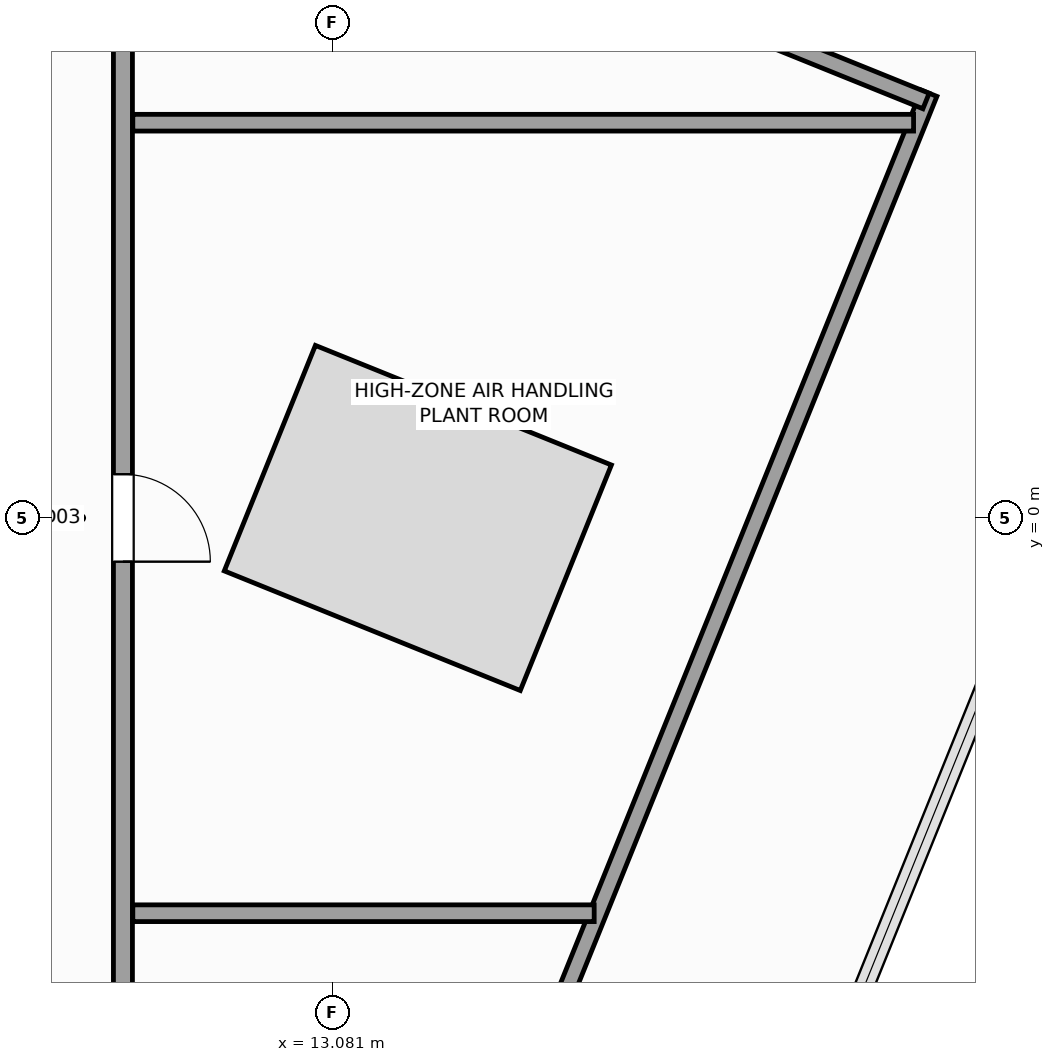
"""IFC4 building model, lengths in metres.
Left out: names, types, materials, properties, quantities, classifications, styles, units other than length and angle.
Written with IfcOpenShell. Run it as: python <this file> out.ifc"""

import sys

from ifc_helpers import new_model, si_unit, direction, frame, frame_2d, origin, place, context, subcontext, project, spatial, rectangle, extrude, source, transform, mapped, element, fill, save


model = new_model("IFC4")
c1 = context("Model", 3, precision=1e-05, world=origin(), true_north=direction((0.0, 1.0)))
c2 = subcontext(c1, "Body", "Model", "MODEL_VIEW")
j1 = project(units=[si_unit("LENGTHUNIT", "METRE"), si_unit("PLANEANGLEUNIT", "RADIAN")], contexts=[c1])
p1 = place(None, origin())
s1 = spatial("IfcSite", under=j1, at=p1, CompositionType="ELEMENT")
p2 = place(p1, origin())
s2 = spatial("IfcBuilding", under=s1, at=p2, CompositionType="ELEMENT")
p3 = place(p2, frame((0.0, 0.0, 325.6)))
s3 = spatial("IfcBuildingStorey", under=s2, at=p3, CompositionType="ELEMENT", Elevation=325.6)
p4 = place(p3, frame((11.172, -18.556, 0.0), z_axis=(0.0, 0.0, 1.0), x_axis=(0.374611707018, 0.927181788521, 0.0)))
e1 = element("IfcWall", 1, at=p4, inside=s3, PredefinedType="PARTITIONING", context=c2, shape_type="SweptSolid", body=[
    extrude(rectangle(XDim=26.04, YDim=0.22, at=frame_2d((13.02, 0.0))), origin(), (0.0, 0.0, 1.0), 3.05),
])
p5 = place(p3, frame((20.886, 5.486, 0.0), z_axis=(0.0, 0.0, 1.0), x_axis=(-0.927189216671, 0.374593321469, 0.0)))
e2 = element("IfcWall", 2, at=p5, inside=s3, PredefinedType="PARTITIONING", context=c2, shape_type="SweptSolid", body=[
    extrude(rectangle(XDim=4.4, YDim=0.22, at=frame_2d((2.2, 0.0))), origin(), (0.0, 0.0, 1.0), 3.7),
])
p6 = place(p3, frame((10.32, -10.22, 0.0), z_axis=(0.0, 0.0, 1.0), x_axis=(0.0, 1.0, 0.0)))
e3 = element("IfcWall", 3, at=p6, inside=s3, PredefinedType="PARTITIONING", context=c2, shape_type="SweptSolid", body=[
    extrude(rectangle(XDim=20.44, YDim=0.25, at=frame_2d((10.22, 0.0))), origin(), (0.0, 0.0, 1.0), 3.7),
])
p7 = place(p6, frame((9.645, 0.0, 0.0)))
e4 = element("IfcOpeningElement", 4, at=p7, cuts=e3, PredefinedType="OPENING", context=c2, shape_type="SweptSolid", body=[
    extrude(rectangle(XDim=1.15, YDim=2.25, at=frame_2d((0.575, 1.125))), frame((0.0, 0.135, 0.0), z_axis=(0.0, -1.0, 0.0), x_axis=(1.0, 0.0, 0.0)), (0.0, 0.0, 1.0), 0.27),
])
p8 = place(p3, frame((10.45, 5.2, 0.0), z_axis=(0.0, 0.0, 1.0), x_axis=(1.0, 0.0, 0.0)))
e5 = element("IfcWall", 5, at=p8, inside=s3, PredefinedType="PARTITIONING", context=c2, shape_type="SweptSolid", body=[
    extrude(rectangle(XDim=10.272, YDim=0.22, at=frame_2d((5.136, 0.0))), origin(), (0.0, 0.0, 1.0), 3.7),
])
p9 = place(p3, frame((10.45, -5.2, 0.0), z_axis=(0.0, 0.0, 1.0), x_axis=(1.0, 0.0, 0.0)))
e6 = element("IfcWall", 6, at=p9, inside=s3, PredefinedType="PARTITIONING", context=c2, shape_type="SweptSolid", body=[
    extrude(rectangle(XDim=6.07, YDim=0.22, at=frame_2d((3.035, 0.0))), origin(), (0.0, 0.0, 1.0), 3.7),
])
m1 = source(origin(), c2, "Body", "SweptSolid", [
    extrude(rectangle(XDim=1.15, YDim=2.25, at=frame_2d((0.575, 1.125))), frame((0.0, 0.025, 0.0), z_axis=(0.0, -1.0, 0.0), x_axis=(1.0, 0.0, 0.0)), (0.0, 0.0, 1.0), 0.05),
])
p10 = place(p7, frame((1.15, 0.0, 0.0), z_axis=(0.0, 0.0, 1.0), x_axis=(-1.0, 0.0, 0.0)))
e7 = element("IfcDoor", 7, at=p10, inside=s3, OperationType="SINGLE_SWING_LEFT", PredefinedType="DOOR", context=c2, shape_type="MappedRepresentation", body=[
    mapped(m1, transform((0.0, 0.0, 0.0), scale=1.0)),
])
fill(e4, e7)
save(model, sys.argv[1])
